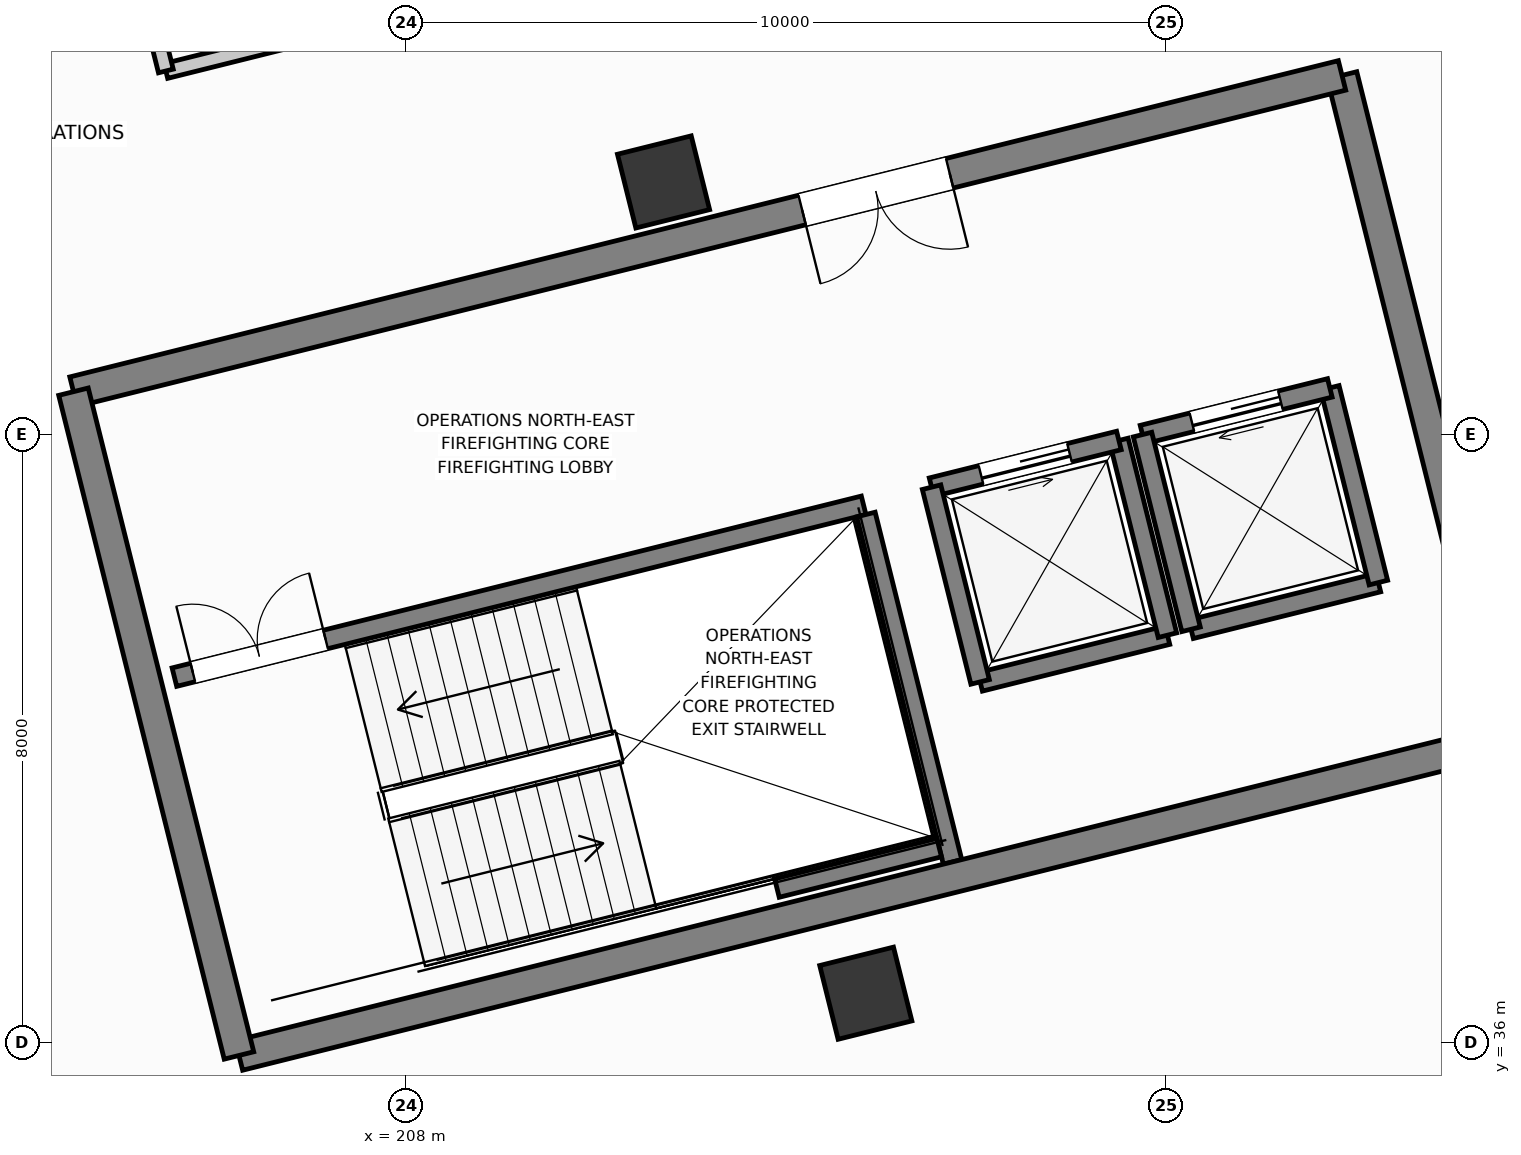
"""IFC4 building model, lengths in metres.
Left out: names, types, materials, properties, quantities, classifications, styles, units other than length and angle.
Written with IfcOpenShell. Run it as: python <this file> out.ifc"""

import sys

from ifc_helpers import new_model, si_unit, direction, frame, frame_2d, origin, origin_2d, place, context, subcontext, project, spatial, rectangle, extrude, element, fill, save


model = new_model("IFC4")
c1 = context("Model", 3, precision=1e-05, world=origin(), true_north=direction((0.0, 1.0)))
c2 = subcontext(c1, "Body", "Model", "MODEL_VIEW")
j1 = project(units=[si_unit("LENGTHUNIT", "METRE"), si_unit("PLANEANGLEUNIT", "RADIAN")], contexts=[c1])
p1 = place(None, origin())
s1 = spatial("IfcSite", under=j1, at=p1, CompositionType="ELEMENT")
p2 = place(p1, origin())
s2 = spatial("IfcBuilding", under=s1, at=p2, CompositionType="ELEMENT")
p3 = place(p2, frame((0.0, 0.0, 16.2)))
s3 = spatial("IfcBuildingStorey", under=s2, at=p3, CompositionType="ELEMENT", Elevation=16.2)
for number, where, z_axis, x_axis in (
    (1, (214.044, 36.652, 0.0), (0.0, 0.0, 1.0), (0.97, 0.242, 0.0)),
    (2, (211.383, 47.325, 0.0), (0.0, 0.0, 1.0), (0.97, 0.242, 0.0)),
):
    element("IfcColumn", number, at=place(p3, frame(where, z_axis=z_axis, x_axis=x_axis)), inside=s3, PredefinedType="COLUMN", context=c2, shape_type="SweptSolid", body=[
        extrude(rectangle(XDim=1.0, YDim=1.0, at=origin_2d()), origin(), (0.0, 0.0, 1.0), 4.2),
    ])
p4 = place(p3, frame((215.548, 40.748, 0.0), z_axis=(0.0, 0.0, 1.0), x_axis=(0.97029284861, 0.241933436994, 0.0)))
e3 = element("IfcWall", 3, at=p4, inside=s3, PredefinedType="SOLIDWALL", context=c2, shape_type="SweptSolid", body=[
    extrude(rectangle(XDim=2.54, YDim=0.25, at=frame_2d((1.27, 0.0))), origin(), (0.0, 0.0, 1.0), 3.87),
])
p5 = place(p3, frame((218.012, 41.362, 0.0), z_axis=(0.0, 0.0, 1.0), x_axis=(-0.241938414856, 0.970291607413, 0.0)))
e4 = element("IfcWall", 4, at=p5, inside=s3, PredefinedType="SOLIDWALL", context=c2, shape_type="SweptSolid", body=[
    extrude(rectangle(XDim=2.64, YDim=0.25, at=frame_2d((1.32, 0.0))), origin(), (0.0, 0.0, 1.0), 3.87),
])
p6 = place(p3, frame((217.374, 43.924, 0.0), z_axis=(0.0, 0.0, 1.0), x_axis=(-0.97029284861, -0.241933436994, 0.0)))
e5 = element("IfcWall", 5, at=p6, inside=s3, PredefinedType="SOLIDWALL", context=c2, shape_type="SweptSolid", body=[
    extrude(rectangle(XDim=2.54, YDim=0.25, at=frame_2d((1.27, 0.0))), origin(), (0.0, 0.0, 1.0), 3.87),
])
p7 = place(p6, frame((0.67, 0.0, 0.0)))
e6 = element("IfcOpeningElement", 6, at=p7, cuts=e5, PredefinedType="OPENING", context=c2, shape_type="SweptSolid", body=[
    extrude(rectangle(XDim=1.2, YDim=2.2, at=frame_2d((0.6, 1.1))), frame((0.0, 0.135, 0.0), z_axis=(0.0, -1.0, 0.0), x_axis=(1.0, 0.0, 0.0)), (0.0, 0.0, 1.0), 0.27),
])
p8 = place(p3, frame((214.909, 43.309, 0.0), z_axis=(0.0, 0.0, 1.0), x_axis=(0.241938414856, -0.970291607413, 0.0)))
e7 = element("IfcWall", 7, at=p8, inside=s3, PredefinedType="SOLIDWALL", context=c2, shape_type="SweptSolid", body=[
    extrude(rectangle(XDim=2.64, YDim=0.25, at=frame_2d((1.32, 0.0))), origin(), (0.0, 0.0, 1.0), 3.87),
])
p9 = place(p3, frame((218.323, 41.44, 0.0), z_axis=(0.0, 0.0, 1.0), x_axis=(0.97029284861, 0.241933436994, 0.0)))
e8 = element("IfcWall", 8, at=p9, inside=s3, PredefinedType="SOLIDWALL", context=c2, shape_type="SweptSolid", body=[
    extrude(rectangle(XDim=2.54, YDim=0.25, at=frame_2d((1.27, 0.0))), origin(), (0.0, 0.0, 1.0), 3.87),
])
p10 = place(p3, frame((220.787, 42.054, 0.0), z_axis=(0.0, 0.0, 1.0), x_axis=(-0.241938414856, 0.970291607413, 0.0)))
e9 = element("IfcWall", 9, at=p10, inside=s3, PredefinedType="SOLIDWALL", context=c2, shape_type="SweptSolid", body=[
    extrude(rectangle(XDim=2.64, YDim=0.25, at=frame_2d((1.32, 0.0))), origin(), (0.0, 0.0, 1.0), 3.87),
])
p11 = place(p3, frame((220.149, 44.616, 0.0), z_axis=(0.0, 0.0, 1.0), x_axis=(-0.97029284861, -0.241933436994, 0.0)))
e10 = element("IfcWall", 10, at=p11, inside=s3, PredefinedType="SOLIDWALL", context=c2, shape_type="SweptSolid", body=[
    extrude(rectangle(XDim=2.54, YDim=0.25, at=frame_2d((1.27, 0.0))), origin(), (0.0, 0.0, 1.0), 3.87),
])
p12 = place(p11, frame((0.67, 0.0, 0.0)))
e11 = element("IfcOpeningElement", 11, at=p12, cuts=e10, PredefinedType="OPENING", context=c2, shape_type="SweptSolid", body=[
    extrude(rectangle(XDim=1.2, YDim=2.2, at=frame_2d((0.6, 1.1))), frame((0.0, 0.135, 0.0), z_axis=(0.0, -1.0, 0.0), x_axis=(1.0, 0.0, 0.0)), (0.0, 0.0, 1.0), 0.27),
])
p13 = place(p3, frame((217.684, 44.001, 0.0), z_axis=(0.0, 0.0, 1.0), x_axis=(0.241938414856, -0.970291607413, 0.0)))
e12 = element("IfcWall", 12, at=p13, inside=s3, PredefinedType="SOLIDWALL", context=c2, shape_type="SweptSolid", body=[
    extrude(rectangle(XDim=2.64, YDim=0.25, at=frame_2d((1.32, 0.0))), origin(), (0.0, 0.0, 1.0), 3.87),
])
p14 = place(p3, frame((204.948, 40.81, 0.0), z_axis=(0.0, 0.0, 1.0), x_axis=(0.970297151331, 0.241916179943, 0.0)))
e13 = element("IfcWall", 13, at=p14, inside=s3, PredefinedType="SOLIDWALL", context=c2, shape_type="SweptSolid", body=[
    extrude(rectangle(XDim=9.345, YDim=0.25, at=frame_2d((4.673, 0.0))), origin(), (0.0, 0.0, 1.0), 3.84),
])
p15 = place(p14, frame((0.25, 0.0, 0.0)))
e14 = element("IfcOpeningElement", 14, at=p15, cuts=e13, PredefinedType="OPENING", context=c2, shape_type="SweptSolid", body=[
    extrude(rectangle(XDim=1.8, YDim=2.25, at=frame_2d((0.9, 1.125))), frame((0.0, 0.135, 0.0), z_axis=(0.0, -1.0, 0.0), x_axis=(1.0, 0.0, 0.0)), (0.0, 0.0, 1.0), 0.27),
])
p16 = place(p3, frame((215.185, 38.38, 0.0), z_axis=(0.0, 0.0, 1.0), x_axis=(-0.241911120435, 0.970298412763, 0.0)))
e15 = element("IfcWall", 15, at=p16, inside=s3, PredefinedType="SOLIDWALL", context=c2, shape_type="SweptSolid", body=[
    extrude(rectangle(XDim=4.71, YDim=0.25, at=frame_2d((2.355, 0.0))), origin(), (0.0, 0.0, 1.0), 3.84),
])
p17 = place(p3, frame((212.875, 38.035, 0.0), z_axis=(0.0, 0.0, 1.0), x_axis=(0.97029738597, 0.241915238833, 0.0)))
e16 = element("IfcWall", 16, at=p17, inside=s3, PredefinedType="SOLIDWALL", context=c2, shape_type="SweptSolid", body=[
    extrude(rectangle(XDim=2.2, YDim=0.25, at=frame_2d((1.1, 0.0))), origin(), (0.0, 0.0, 1.0), 3.84),
])
p18 = place(p3, frame((205.797, 35.833, 0.0), z_axis=(0.0, 0.0, 1.0), x_axis=(0.970295179998, 0.241924086589, 0.0)))
e17 = element("IfcWall", 17, at=p18, inside=s3, PredefinedType="SHEAR", context=c2, shape_type="SweptSolid", body=[
    extrude(rectangle(XDim=17.2, YDim=0.4, at=frame_2d((8.6, 0.0))), origin(), (0.0, 0.0, 1.0), 3.87),
])
p19 = place(p3, frame((222.486, 39.994, 0.0), z_axis=(0.0, 0.0, 1.0), x_axis=(-0.241923808098, 0.970295249435, 0.0)))
e18 = element("IfcWall", 18, at=p19, inside=s3, PredefinedType="SHEAR", context=c2, shape_type="SweptSolid", body=[
    extrude(rectangle(XDim=9.0, YDim=0.4, at=frame_2d((4.5, 0.0))), origin(), (0.0, 0.0, 1.0), 3.87),
])
p20 = place(p3, frame((220.309, 48.727, 0.0), z_axis=(0.0, 0.0, 1.0), x_axis=(-0.970296544738, -0.241918612906, 0.0)))
e19 = element("IfcWall", 19, at=p20, inside=s3, PredefinedType="SHEAR", context=c2, shape_type="SweptSolid", body=[
    extrude(rectangle(XDim=17.2, YDim=0.4, at=frame_2d((8.6, 0.0))), origin(), (0.0, 0.0, 1.0), 3.87),
])
p21 = place(p20, frame((5.32, 0.0, 0.0)))
e20 = element("IfcOpeningElement", 20, at=p21, cuts=e19, PredefinedType="OPENING", context=c2, shape_type="SweptSolid", body=[
    extrude(rectangle(XDim=2.0, YDim=2.3, at=frame_2d((1.0, 1.15))), frame((0.0, 0.21, 0.0), z_axis=(0.0, -1.0, 0.0), x_axis=(1.0, 0.0, 0.0)), (0.0, 0.0, 1.0), 0.42),
])
p22 = place(p3, frame((203.62, 44.566, 0.0), z_axis=(0.0, 0.0, 1.0), x_axis=(0.241921199913, -0.97029589973, 0.0)))
e21 = element("IfcWall", 21, at=p22, inside=s3, PredefinedType="SHEAR", context=c2, shape_type="SweptSolid", body=[
    extrude(rectangle(XDim=9.0, YDim=0.4, at=frame_2d((4.5, 0.0))), origin(), (0.0, 0.0, 1.0), 3.87),
])
p23 = place(p3, frame((199.015, 48.983, 0.0), z_axis=(0.0, 0.0, 1.0), x_axis=(0.241922165924, -0.970295658877, 0.0)))
e22 = element("IfcWall", 22, at=p23, inside=s3, PredefinedType="PARTITIONING", context=c2, shape_type="SweptSolid", body=[
    extrude(rectangle(XDim=22.9, YDim=0.16, at=frame_2d((11.45, 0.0))), origin(), (0.0, 0.0, 1.0), 2.585),
])
p24 = place(p23, frame((10.9, 0.0, 0.0)))
e23 = element("IfcOpeningElement", 23, at=p24, cuts=e22, PredefinedType="OPENING", context=c2, shape_type="SweptSolid", body=[
    extrude(rectangle(XDim=1.1, YDim=2.2, at=frame_2d((0.55, 1.1))), frame((0.0, 0.09, 0.0), z_axis=(0.0, -1.0, 0.0), x_axis=(1.0, 0.0, 0.0)), (0.0, 0.0, 1.0), 0.18),
])
p25 = place(p3, frame((220.748, 52.752, 0.0), z_axis=(0.0, 0.0, 1.0), x_axis=(-0.970296178232, -0.241920082897, 0.0)))
e24 = element("IfcWall", 24, at=p25, inside=s3, PredefinedType="PARTITIONING", context=c2, shape_type="SweptSolid", body=[
    extrude(rectangle(XDim=16.4, YDim=0.2, at=frame_2d((8.2, 0.0))), origin(), (0.0, 0.0, 1.0), 2.785),
])
p26 = place(p25, frame((7.65, 0.0, 0.0)))
e25 = element("IfcOpeningElement", 25, at=p26, cuts=e24, PredefinedType="OPENING", context=c2, shape_type="SweptSolid", body=[
    extrude(rectangle(XDim=1.1, YDim=2.2, at=frame_2d((0.55, 1.1))), frame((0.0, 0.11, 0.0), z_axis=(0.0, -1.0, 0.0), x_axis=(1.0, 0.0, 0.0)), (0.0, 0.0, 1.0), 0.22),
])
p27 = place(p3, frame((204.835, 48.785, 0.0), z_axis=(0.0, 0.0, 1.0), x_axis=(-0.241921368909, 0.970295857595, 0.0)))
e26 = element("IfcWall", 26, at=p27, inside=s3, PredefinedType="PARTITIONING", context=c2, shape_type="SweptSolid", body=[
    extrude(rectangle(XDim=15.4, YDim=0.2, at=frame_2d((7.7, 0.0))), origin(), (0.0, 0.0, 1.0), 3.195),
])
p28 = place(p7, origin())
e27 = element("IfcDoor", 27, at=p28, inside=s3, OperationType="SLIDING_TO_LEFT", PredefinedType="DOOR", context=c2, shape_type="SweptSolid", body=[
    extrude(rectangle(XDim=1.2, YDim=2.2, at=frame_2d((0.6, 1.1))), frame((0.0, 0.025, 0.0), z_axis=(0.0, -1.0, 0.0), x_axis=(1.0, 0.0, 0.0)), (0.0, 0.0, 1.0), 0.05),
])
fill(e6, e27)
p29 = place(p12, origin())
e28 = element("IfcDoor", 28, at=p29, inside=s3, OperationType="SLIDING_TO_RIGHT", PredefinedType="DOOR", context=c2, shape_type="SweptSolid", body=[
    extrude(rectangle(XDim=1.2, YDim=2.2, at=frame_2d((0.6, 1.1))), frame((0.0, 0.025, 0.0), z_axis=(0.0, -1.0, 0.0), x_axis=(1.0, 0.0, 0.0)), (0.0, 0.0, 1.0), 0.05),
])
fill(e11, e28)
p30 = place(p15, origin())
e29 = element("IfcDoor", 29, at=p30, inside=s3, OperationType="DOUBLE_DOOR_SINGLE_SWING", PredefinedType="DOOR", context=c2, shape_type="SweptSolid", body=[
    extrude(rectangle(XDim=1.8, YDim=2.25, at=frame_2d((0.9, 1.125))), frame((0.0, 0.025, 0.0), z_axis=(0.0, -1.0, 0.0), x_axis=(1.0, 0.0, 0.0)), (0.0, 0.0, 1.0), 0.05),
])
fill(e14, e29)
p31 = place(p21, origin())
e30 = element("IfcDoor", 30, at=p31, inside=s3, OperationType="DOUBLE_DOOR_SINGLE_SWING", PredefinedType="DOOR", context=c2, shape_type="SweptSolid", body=[
    extrude(rectangle(XDim=2.0, YDim=2.3, at=frame_2d((1.0, 1.15))), frame((0.0, 0.025, 0.0), z_axis=(0.0, -1.0, 0.0), x_axis=(1.0, 0.0, 0.0)), (0.0, 0.0, 1.0), 0.05),
])
fill(e20, e30)
save(model, sys.argv[1])
